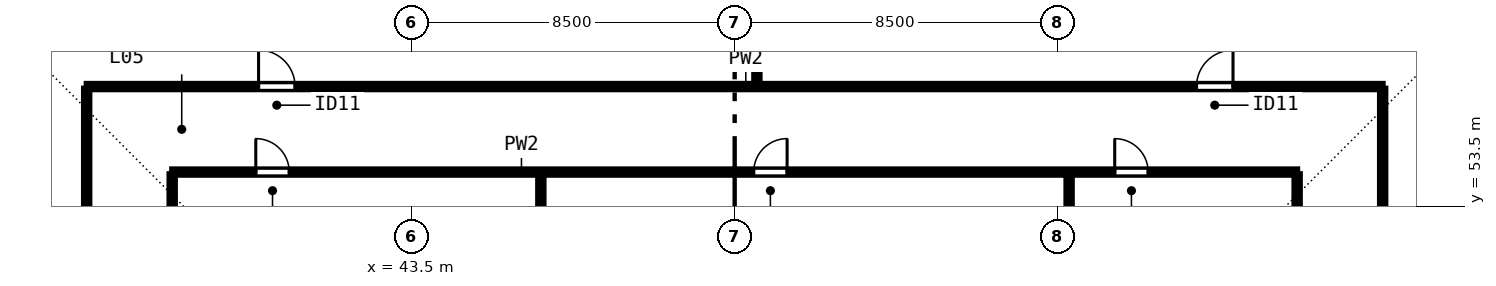
"""IFC4 building model, lengths in metres.
Left out: names, types, materials, properties, quantities, classifications, styles, units other than length and angle.
Written with IfcOpenShell. Run it as: python <this file> out.ifc"""

import sys

from ifc_helpers import new_model, si_unit, direction, frame, frame_2d, origin, place, context, subcontext, project, spatial, rectangle, extrude, element, fill, save


model = new_model("IFC4")
c1 = context("Model", 3, precision=1e-05, world=origin(), true_north=direction((0.0, 1.0)))
c2 = subcontext(c1, "Body", "Model", "MODEL_VIEW")
j1 = project(units=[si_unit("LENGTHUNIT", "METRE"), si_unit("PLANEANGLEUNIT", "RADIAN")], contexts=[c1])
p1 = place(None, origin())
s1 = spatial("IfcSite", under=j1, at=p1, CompositionType="ELEMENT")
p2 = place(p1, origin())
s2 = spatial("IfcBuilding", under=s1, at=p2, CompositionType="ELEMENT")
p3 = place(p2, frame((0.0, 0.0, 23.5)))
s3 = spatial("IfcBuildingStorey", under=s2, at=p3, CompositionType="ELEMENT", Elevation=23.5)
p4 = place(p3, frame((34.95, 56.65, 0.0), z_axis=(0.0, 0.0, 1.0), x_axis=(1.0, 0.0, 0.0)))
e1 = element("IfcWall", 1, at=p4, inside=s3, PredefinedType="PARTITIONING", context=c2, shape_type="SweptSolid", body=[
    extrude(rectangle(XDim=34.1, YDim=0.14, at=frame_2d((17.05, 0.0))), origin(), (0.0, 0.0, 1.0), 3.28),
])
p5 = place(p4, frame((4.522, 0.0, 0.0)))
e2 = element("IfcOpeningElement", 2, at=p5, cuts=e1, PredefinedType="OPENING", context=c2, shape_type="SweptSolid", body=[
    extrude(rectangle(XDim=0.96, YDim=2.12, at=frame_2d((0.48, 1.06))), frame((0.0, 0.08, 0.0), z_axis=(0.0, -1.0, 0.0), x_axis=(1.0, 0.0, 0.0)), (0.0, 0.0, 1.0), 0.16),
])
p6 = place(p4, frame((29.202, 0.0, 0.0)))
e3 = element("IfcOpeningElement", 3, at=p6, cuts=e1, PredefinedType="OPENING", context=c2, shape_type="SweptSolid", body=[
    extrude(rectangle(XDim=0.96, YDim=2.12, at=frame_2d((0.48, 1.06))), frame((0.0, 0.08, 0.0), z_axis=(0.0, -1.0, 0.0), x_axis=(1.0, 0.0, 0.0)), (0.0, 0.0, 1.0), 0.16),
])
p7 = place(p3, frame((34.95, 21.405, 0.0), z_axis=(0.0, 0.0, 1.0), x_axis=(0.0, 1.0, 0.0)))
e4 = element("IfcWall", 4, at=p7, inside=s3, PredefinedType="PARTITIONING", context=c2, shape_type="SweptSolid", body=[
    extrude(rectangle(XDim=35.19, YDim=0.14, at=frame_2d((17.595, 0.0))), origin(), (0.0, 0.0, 1.0), 3.28),
])
p8 = place(p7, frame((5.21, 0.0, 0.0)))
e5 = element("IfcOpeningElement", 5, at=p8, cuts=e4, PredefinedType="OPENING", context=c2, shape_type="SweptSolid", body=[
    extrude(rectangle(XDim=0.96, YDim=2.12, at=frame_2d((0.48, 1.06))), frame((0.0, 0.08, 0.0), z_axis=(0.0, -1.0, 0.0), x_axis=(1.0, 0.0, 0.0)), (0.0, 0.0, 1.0), 0.16),
])
p9 = place(p7, frame((17.052, 0.0, 0.0)))
e6 = element("IfcOpeningElement", 6, at=p9, cuts=e4, PredefinedType="OPENING", context=c2, shape_type="SweptSolid", body=[
    extrude(rectangle(XDim=0.96, YDim=2.12, at=frame_2d((0.48, 1.06))), frame((0.0, 0.08, 0.0), z_axis=(0.0, -1.0, 0.0), x_axis=(1.0, 0.0, 0.0)), (0.0, 0.0, 1.0), 0.16),
])
p10 = place(p7, frame((28.957, 0.0, 0.0)))
e7 = element("IfcOpeningElement", 7, at=p10, cuts=e4, PredefinedType="OPENING", context=c2, shape_type="SweptSolid", body=[
    extrude(rectangle(XDim=0.96, YDim=2.12, at=frame_2d((0.48, 1.06))), frame((0.0, 0.08, 0.0), z_axis=(0.0, -1.0, 0.0), x_axis=(1.0, 0.0, 0.0)), (0.0, 0.0, 1.0), 0.16),
])
p11 = place(p3, frame((69.05, 21.405, 0.0), z_axis=(0.0, 0.0, 1.0), x_axis=(0.0, 1.0, 0.0)))
e8 = element("IfcWall", 8, at=p11, inside=s3, PredefinedType="PARTITIONING", context=c2, shape_type="SweptSolid", body=[
    extrude(rectangle(XDim=35.19, YDim=0.14, at=frame_2d((17.595, 0.0))), origin(), (0.0, 0.0, 1.0), 3.28),
])
p12 = place(p11, frame((8.545, 0.0, 0.0)))
e9 = element("IfcOpeningElement", 9, at=p12, cuts=e8, PredefinedType="OPENING", context=c2, shape_type="SweptSolid", body=[
    extrude(rectangle(XDim=0.96, YDim=2.12, at=frame_2d((0.48, 1.06))), frame((0.0, 0.08, 0.0), z_axis=(0.0, -1.0, 0.0), x_axis=(1.0, 0.0, 0.0)), (0.0, 0.0, 1.0), 0.16),
])
p13 = place(p11, frame((26.095, 0.0, 0.0)))
e10 = element("IfcOpeningElement", 10, at=p13, cuts=e8, PredefinedType="OPENING", context=c2, shape_type="SweptSolid", body=[
    extrude(rectangle(XDim=0.96, YDim=2.12, at=frame_2d((0.48, 1.06))), frame((0.0, 0.08, 0.0), z_axis=(0.0, -1.0, 0.0), x_axis=(1.0, 0.0, 0.0)), (0.0, 0.0, 1.0), 0.16),
])
p14 = place(p3, frame((37.2, 54.4, 0.0), z_axis=(0.0, 0.0, 1.0), x_axis=(1.0, 0.0, 0.0)))
e11 = element("IfcWall", 11, at=p14, inside=s3, PredefinedType="PARTITIONING", context=c2, shape_type="SweptSolid", body=[
    extrude(rectangle(XDim=29.6, YDim=0.14, at=frame_2d((14.8, 0.0))), origin(), (0.0, 0.0, 1.0), 3.28),
])
p15 = place(p14, frame((2.2, 0.0, 0.0)))
e12 = element("IfcOpeningElement", 12, at=p15, cuts=e11, PredefinedType="OPENING", context=c2, shape_type="SweptSolid", body=[
    extrude(rectangle(XDim=0.88, YDim=2.1, at=frame_2d((0.44, 1.05))), frame((0.0, 0.08, 0.0), z_axis=(0.0, -1.0, 0.0), x_axis=(1.0, 0.0, 0.0)), (0.0, 0.0, 1.0), 0.16),
])
p16 = place(p14, frame((15.3, 0.0, 0.0)))
e13 = element("IfcOpeningElement", 13, at=p16, cuts=e11, PredefinedType="OPENING", context=c2, shape_type="SweptSolid", body=[
    extrude(rectangle(XDim=0.88, YDim=2.1, at=frame_2d((0.44, 1.05))), frame((0.0, 0.08, 0.0), z_axis=(0.0, -1.0, 0.0), x_axis=(1.0, 0.0, 0.0)), (0.0, 0.0, 1.0), 0.16),
])
p17 = place(p14, frame((24.8, 0.0, 0.0)))
e14 = element("IfcOpeningElement", 14, at=p17, cuts=e11, PredefinedType="OPENING", context=c2, shape_type="SweptSolid", body=[
    extrude(rectangle(XDim=0.88, YDim=2.1, at=frame_2d((0.44, 1.05))), frame((0.0, 0.08, 0.0), z_axis=(0.0, -1.0, 0.0), x_axis=(1.0, 0.0, 0.0)), (0.0, 0.0, 1.0), 0.16),
])
p18 = place(p3, frame((37.2, 40.8, 0.0), z_axis=(0.0, 0.0, 1.0), x_axis=(0.0, 1.0, 0.0)))
e15 = element("IfcWall", 15, at=p18, inside=s3, PredefinedType="PARTITIONING", context=c2, shape_type="SweptSolid", body=[
    extrude(rectangle(XDim=13.545, YDim=0.14, at=frame_2d((6.772, 0.0))), origin(), (0.0, 0.0, 1.0), 3.28),
])
p19 = place(p18, frame((2.5, 0.0, 0.0)))
e16 = element("IfcOpeningElement", 16, at=p19, cuts=e15, PredefinedType="OPENING", context=c2, shape_type="SweptSolid", body=[
    extrude(rectangle(XDim=0.88, YDim=2.1, at=frame_2d((0.44, 1.05))), frame((0.0, 0.08, 0.0), z_axis=(0.0, -1.0, 0.0), x_axis=(1.0, 0.0, 0.0)), (0.0, 0.0, 1.0), 0.16),
])
p20 = place(p3, frame((66.8, 40.8, 0.0), z_axis=(0.0, 0.0, 1.0), x_axis=(0.0, 1.0, 0.0)))
e17 = element("IfcWall", 17, at=p20, inside=s3, PredefinedType="PARTITIONING", context=c2, shape_type="SweptSolid", body=[
    extrude(rectangle(XDim=13.545, YDim=0.14, at=frame_2d((6.772, 0.0))), origin(), (0.0, 0.0, 1.0), 3.28),
])
p21 = place(p20, frame((2.5, 0.0, 0.0)))
e18 = element("IfcOpeningElement", 18, at=p21, cuts=e17, PredefinedType="OPENING", context=c2, shape_type="SweptSolid", body=[
    extrude(rectangle(XDim=0.88, YDim=2.1, at=frame_2d((0.44, 1.05))), frame((0.0, 0.08, 0.0), z_axis=(0.0, -1.0, 0.0), x_axis=(1.0, 0.0, 0.0)), (0.0, 0.0, 1.0), 0.16),
])
p22 = place(p3, frame((46.9, 47.76, 0.0), z_axis=(0.0, 0.0, 1.0), x_axis=(0.0, 1.0, 0.0)))
e19 = element("IfcWall", 19, at=p22, inside=s3, PredefinedType="PARTITIONING", context=c2, shape_type="SweptSolid", body=[
    extrude(rectangle(XDim=6.585, YDim=0.14, at=frame_2d((3.292, 0.0))), origin(), (0.0, 0.0, 1.0), 3.28),
])
p23 = place(p3, frame((60.8, 47.76, 0.0), z_axis=(0.0, 0.0, 1.0), x_axis=(0.0, 1.0, 0.0)))
e20 = element("IfcWall", 20, at=p23, inside=s3, PredefinedType="PARTITIONING", context=c2, shape_type="SweptSolid", body=[
    extrude(rectangle(XDim=6.585, YDim=0.14, at=frame_2d((3.292, 0.0))), origin(), (0.0, 0.0, 1.0), 2.439),
])
p24 = place(p3, frame((52.585, 56.75, 0.0), z_axis=(0.0, 0.0, 1.0), x_axis=(0.0, 1.0, 0.0)))
e21 = element("IfcWall", 21, at=p24, inside=s3, PredefinedType="PARTITIONING", context=c2, shape_type="SweptSolid", body=[
    extrude(rectangle(XDim=7.33, YDim=0.14, at=frame_2d((3.665, 0.0))), origin(), (0.0, 0.0, 1.0), 2.849),
])
p25 = place(p15, origin())
e22 = element("IfcDoor", 22, at=p25, inside=s3, OperationType="SINGLE_SWING_LEFT", PredefinedType="DOOR", context=c2, shape_type="SweptSolid", body=[
    extrude(rectangle(XDim=0.88, YDim=2.1, at=frame_2d((0.44, 1.05))), frame((0.0, 0.025, 0.0), z_axis=(0.0, -1.0, 0.0), x_axis=(1.0, 0.0, 0.0)), (0.0, 0.0, 1.0), 0.05),
])
fill(e12, e22)
p26 = place(p16, origin())
e23 = element("IfcDoor", 23, at=p26, inside=s3, OperationType="SINGLE_SWING_RIGHT", PredefinedType="DOOR", context=c2, shape_type="SweptSolid", body=[
    extrude(rectangle(XDim=0.88, YDim=2.1, at=frame_2d((0.44, 1.05))), frame((0.0, 0.025, 0.0), z_axis=(0.0, -1.0, 0.0), x_axis=(1.0, 0.0, 0.0)), (0.0, 0.0, 1.0), 0.05),
])
fill(e13, e23)
p27 = place(p17, origin())
e24 = element("IfcDoor", 24, at=p27, inside=s3, OperationType="SINGLE_SWING_LEFT", PredefinedType="DOOR", context=c2, shape_type="SweptSolid", body=[
    extrude(rectangle(XDim=0.88, YDim=2.1, at=frame_2d((0.44, 1.05))), frame((0.0, 0.025, 0.0), z_axis=(0.0, -1.0, 0.0), x_axis=(1.0, 0.0, 0.0)), (0.0, 0.0, 1.0), 0.05),
])
fill(e14, e24)
p28 = place(p5, origin())
e25 = element("IfcDoor", 25, at=p28, inside=s3, OperationType="SINGLE_SWING_LEFT", PredefinedType="DOOR", context=c2, shape_type="SweptSolid", body=[
    extrude(rectangle(XDim=0.96, YDim=2.12, at=frame_2d((0.48, 1.06))), frame((0.0, 0.025, 0.0), z_axis=(0.0, -1.0, 0.0), x_axis=(1.0, 0.0, 0.0)), (0.0, 0.0, 1.0), 0.05),
])
fill(e2, e25)
p29 = place(p6, origin())
e26 = element("IfcDoor", 26, at=p29, inside=s3, OperationType="SINGLE_SWING_RIGHT", PredefinedType="DOOR", context=c2, shape_type="SweptSolid", body=[
    extrude(rectangle(XDim=0.96, YDim=2.12, at=frame_2d((0.48, 1.06))), frame((0.0, 0.025, 0.0), z_axis=(0.0, -1.0, 0.0), x_axis=(1.0, 0.0, 0.0)), (0.0, 0.0, 1.0), 0.05),
])
fill(e3, e26)
save(model, sys.argv[1])
